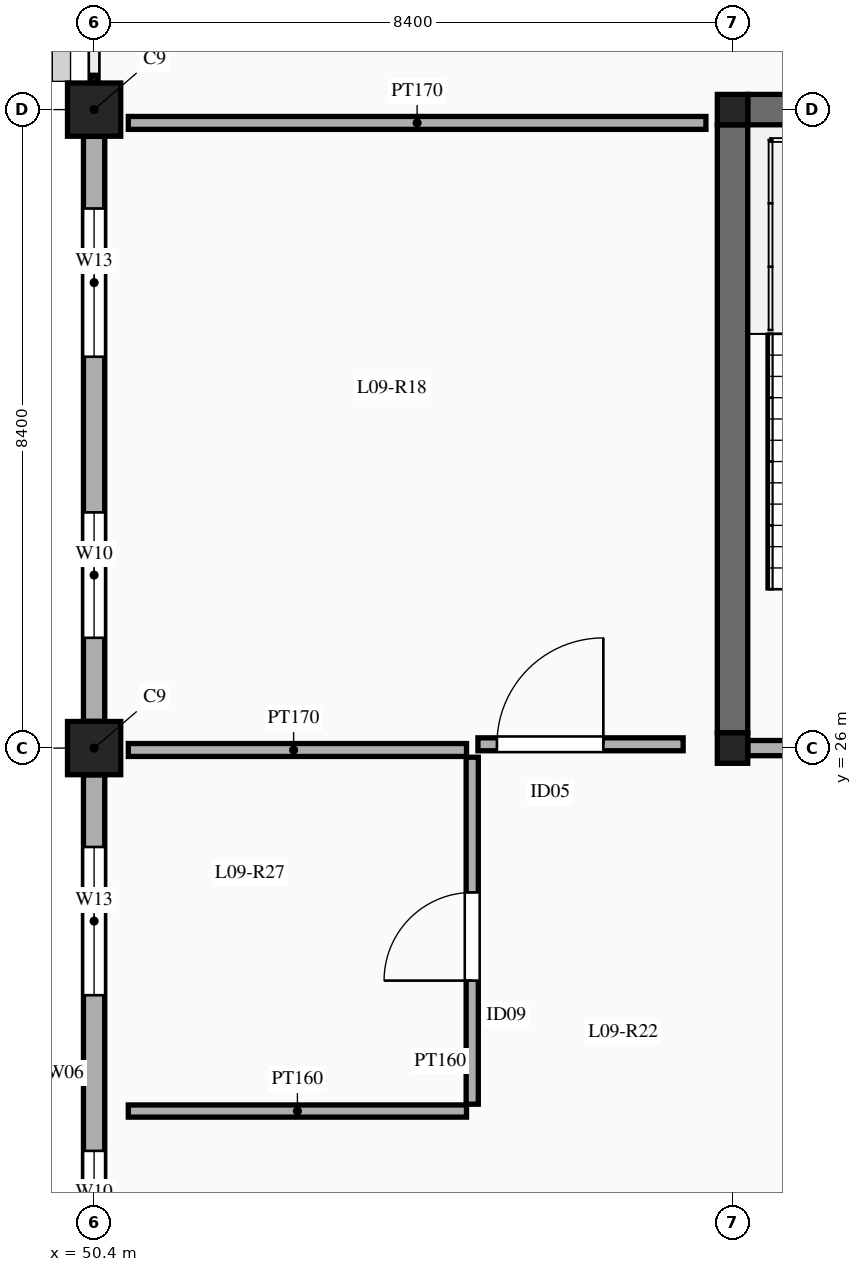
"""IFC4 building model, lengths in metres.
Left out: names, types, materials, properties, quantities, classifications, styles, units other than length and angle.
Written with IfcOpenShell. Run it as: python <this file> out.ifc"""

import sys

from ifc_helpers import new_model, si_unit, direction, frame, frame_2d, origin, origin_2d, place, context, subcontext, project, spatial, rectangle, extrude, element, fill, save


model = new_model("IFC4")
c1 = context("Model", 3, precision=1e-05, world=origin(), true_north=direction((0.0, 1.0)))
c2 = subcontext(c1, "Body", "Model", "MODEL_VIEW")
j1 = project(units=[si_unit("LENGTHUNIT", "METRE"), si_unit("PLANEANGLEUNIT", "RADIAN")], contexts=[c1])
p1 = place(None, origin())
s1 = spatial("IfcSite", under=j1, at=p1, CompositionType="ELEMENT")
p2 = place(p1, origin())
s2 = spatial("IfcBuilding", under=s1, at=p2, CompositionType="ELEMENT")
p3 = place(p2, frame((0.0, 0.0, 42.0)))
s3 = spatial("IfcBuildingStorey", under=s2, at=p3, CompositionType="ELEMENT", Elevation=42.0)
for number, where, z_axis, x_axis in (
    (1, (50.4, 26.0, 0.0), (0.0, 0.0, 1.0), (1.0, 0.0, 0.0)),
    (2, (50.4, 34.4, 0.0), (0.0, 0.0, 1.0), (1.0, 0.0, 0.0)),
):
    element("IfcColumn", number, at=place(p3, frame(where, z_axis=z_axis, x_axis=x_axis)), inside=s3, PredefinedType="COLUMN", context=c2, shape_type="SweptSolid", body=[
        extrude(rectangle(XDim=0.7, YDim=0.7, at=origin_2d()), origin(), (0.0, 0.0, 1.0), 4.5),
    ])
for number, where, z_axis, x_axis in (
    (3, (58.8, 26.0, 0.0), (0.0, 0.0, 1.0), (1.0, 0.0, 0.0)),
    (4, (58.8, 34.4, 0.0), (0.0, 0.0, 1.0), (1.0, 0.0, 0.0)),
):
    element("IfcColumn", number, at=place(p3, frame(where, z_axis=z_axis, x_axis=x_axis)), inside=s3, PredefinedType="COLUMN", context=c2, shape_type="SweptSolid", body=[
        extrude(rectangle(XDim=0.4, YDim=0.4, at=origin_2d()), origin(), (0.0, 0.0, 1.0), 4.5),
    ])
for number, where, z_axis, x_axis in (
    (5, (58.8, 26.2, 0.0), (0.0, 0.0, 1.0), (0.0, 1.0, 0.0)),
    (6, (59.0, 34.4, 0.0), (0.0, 0.0, 1.0), (1.0, 0.0, 0.0)),
):
    element("IfcWall", number, at=place(p3, frame(where, z_axis=z_axis, x_axis=x_axis)), inside=s3, PredefinedType="SHEAR", context=c2, shape_type="SweptSolid", body=[
        extrude(rectangle(XDim=8.0, YDim=0.4, at=frame_2d((4.0, 0.0))), origin(), (0.0, 0.0, 1.0), 4.5),
    ])
p4 = place(p3, frame((50.4, 17.952, 0.0), z_axis=(0.0, 0.0, 1.0), x_axis=(0.0, 1.0, 0.0)))
e7 = element("IfcWall", 7, at=p4, inside=s3, PredefinedType="ELEMENTEDWALL", context=c2, shape_type="SweptSolid", body=[
    extrude(rectangle(XDim=7.696, YDim=0.28, at=frame_2d((3.848, 0.0))), origin(), (0.0, 0.0, 1.0), 3.55),
])
p5 = place(p4, frame((1.099, 0.0, 0.9)))
e8 = element("IfcOpeningElement", 8, at=p5, cuts=e7, PredefinedType="OPENING", context=c2, shape_type="SweptSolid", body=[
    extrude(rectangle(XDim=1.65, YDim=1.95, at=frame_2d((0.825, 0.975))), frame((0.0, 0.15, 0.0), z_axis=(0.0, -1.0, 0.0), x_axis=(1.0, 0.0, 0.0)), (0.0, 0.0, 1.0), 0.3),
])
p6 = place(p4, frame((4.797, 0.0, 0.9)))
e9 = element("IfcOpeningElement", 9, at=p6, cuts=e7, PredefinedType="OPENING", context=c2, shape_type="SweptSolid", body=[
    extrude(rectangle(XDim=1.95, YDim=2.0, at=frame_2d((0.975, 1.0))), frame((0.0, 0.15, 0.0), z_axis=(0.0, -1.0, 0.0), x_axis=(1.0, 0.0, 0.0)), (0.0, 0.0, 1.0), 0.3),
])
p7 = place(p3, frame((50.4, 26.352, 0.0), z_axis=(0.0, 0.0, 1.0), x_axis=(0.0, 1.0, 0.0)))
e10 = element("IfcWall", 10, at=p7, inside=s3, PredefinedType="ELEMENTEDWALL", context=c2, shape_type="SweptSolid", body=[
    extrude(rectangle(XDim=7.696, YDim=0.28, at=frame_2d((3.848, 0.0))), origin(), (0.0, 0.0, 1.0), 3.55),
])
p8 = place(p7, frame((1.099, 0.0, 0.9)))
e11 = element("IfcOpeningElement", 11, at=p8, cuts=e10, PredefinedType="OPENING", context=c2, shape_type="SweptSolid", body=[
    extrude(rectangle(XDim=1.65, YDim=1.95, at=frame_2d((0.825, 0.975))), frame((0.0, 0.15, 0.0), z_axis=(0.0, -1.0, 0.0), x_axis=(1.0, 0.0, 0.0)), (0.0, 0.0, 1.0), 0.3),
])
p9 = place(p7, frame((4.797, 0.0, 0.9)))
e12 = element("IfcOpeningElement", 12, at=p9, cuts=e10, PredefinedType="OPENING", context=c2, shape_type="SweptSolid", body=[
    extrude(rectangle(XDim=1.95, YDim=2.0, at=frame_2d((0.975, 1.0))), frame((0.0, 0.15, 0.0), z_axis=(0.0, -1.0, 0.0), x_axis=(1.0, 0.0, 0.0)), (0.0, 0.0, 1.0), 0.3),
])
p10 = place(p3, frame((59.0, 26.0, 0.0), z_axis=(0.0, 0.0, 1.0), x_axis=(1.0, 0.0, 0.0)))
e13 = element("IfcWall", 13, at=p10, inside=s3, PredefinedType="SOLIDWALL", context=c2, shape_type="SweptSolid", body=[
    extrude(rectangle(XDim=8.0, YDim=0.2, at=frame_2d((4.0, 0.0))), origin(), (0.0, 0.0, 1.0), 3.78),
])
p11 = place(p10, frame((1.55, 0.0, 0.0)))
e14 = element("IfcOpeningElement", 14, at=p11, cuts=e13, PredefinedType="OPENING", context=c2, shape_type="SweptSolid", body=[
    extrude(rectangle(XDim=1.15, YDim=2.15, at=frame_2d((0.575, 1.075))), frame((0.0, 0.11, 0.0), z_axis=(0.0, -1.0, 0.0), x_axis=(1.0, 0.0, 0.0)), (0.0, 0.0, 1.0), 0.22),
])
p12 = place(p10, frame((5.35, 0.0, 0.0)))
e15 = element("IfcOpeningElement", 15, at=p12, cuts=e13, PredefinedType="OPENING", context=c2, shape_type="SweptSolid", body=[
    extrude(rectangle(XDim=1.22, YDim=2.15, at=frame_2d((0.61, 1.075))), frame((0.0, 0.11, 0.0), z_axis=(0.0, -1.0, 0.0), x_axis=(1.0, 0.0, 0.0)), (0.0, 0.0, 1.0), 0.22),
])
p13 = place(p3, frame((55.45, 26.05, 0.0), z_axis=(0.0, 0.0, 1.0), x_axis=(1.0, 0.0, 0.0)))
e16 = element("IfcWall", 16, at=p13, inside=s3, PredefinedType="PARTITIONING", context=c2, shape_type="SweptSolid", body=[
    extrude(rectangle(XDim=2.7, YDim=0.17, at=frame_2d((1.35, 0.0))), origin(), (0.0, 0.0, 1.0), 3.45),
])
p14 = place(p13, frame((0.25, 0.0, 0.0)))
e17 = element("IfcOpeningElement", 17, at=p14, cuts=e16, PredefinedType="OPENING", context=c2, shape_type="SweptSolid", body=[
    extrude(rectangle(XDim=1.4, YDim=2.25, at=frame_2d((0.7, 1.125))), frame((0.0, 0.095, 0.0), z_axis=(0.0, -1.0, 0.0), x_axis=(1.0, 0.0, 0.0)), (0.0, 0.0, 1.0), 0.19),
])
p15 = place(p3, frame((50.85, 25.975, 0.0), z_axis=(0.0, 0.0, 1.0), x_axis=(1.0, 0.0, 0.0)))
e18 = element("IfcWall", 18, at=p15, inside=s3, PredefinedType="PARTITIONING", context=c2, shape_type="SweptSolid", body=[
    extrude(rectangle(XDim=4.45, YDim=0.17, at=frame_2d((2.225, 0.0))), origin(), (0.0, 0.0, 1.0), 3.45),
])
p16 = place(p3, frame((50.85, 34.225, 0.0), z_axis=(0.0, 0.0, 1.0), x_axis=(1.0, 0.0, 0.0)))
e19 = element("IfcWall", 19, at=p16, inside=s3, PredefinedType="PARTITIONING", context=c2, shape_type="SweptSolid", body=[
    extrude(rectangle(XDim=7.6, YDim=0.17, at=frame_2d((3.8, 0.0))), origin(), (0.0, 0.0, 1.0), 3.45),
])
p17 = place(p3, frame((50.85, 21.225, 0.0), z_axis=(0.0, 0.0, 1.0), x_axis=(1.0, 0.0, 0.0)))
e20 = element("IfcWall", 20, at=p17, inside=s3, PredefinedType="PARTITIONING", context=c2, shape_type="SweptSolid", body=[
    extrude(rectangle(XDim=4.45, YDim=0.16, at=frame_2d((2.225, 0.0))), origin(), (0.0, 0.0, 1.0), 3.45),
])
p18 = place(p3, frame((55.375, 21.315, 0.0), z_axis=(0.0, 0.0, 1.0), x_axis=(0.0, 1.0, 0.0)))
e21 = element("IfcWall", 21, at=p18, inside=s3, PredefinedType="PARTITIONING", context=c2, shape_type="SweptSolid", body=[
    extrude(rectangle(XDim=4.565, YDim=0.16, at=frame_2d((2.282, 0.0))), origin(), (0.0, 0.0, 1.0), 3.45),
])
p19 = place(p18, frame((1.626, 0.0, 0.0)))
e22 = element("IfcOpeningElement", 22, at=p19, cuts=e21, PredefinedType="OPENING", context=c2, shape_type="SweptSolid", body=[
    extrude(rectangle(XDim=1.16, YDim=2.2, at=frame_2d((0.58, 1.1))), frame((0.0, 0.09, 0.0), z_axis=(0.0, -1.0, 0.0), x_axis=(1.0, 0.0, 0.0)), (0.0, 0.0, 1.0), 0.18),
])
p20 = place(p5, origin())
e23 = element("IfcWindow", 23, at=p20, inside=s3, PartitioningType="DOUBLE_PANEL_HORIZONTAL", PredefinedType="WINDOW", context=c2, shape_type="SweptSolid", body=[
    extrude(rectangle(XDim=1.65, YDim=1.95, at=frame_2d((0.825, 0.975))), frame((0.0, 0.03, 0.0), z_axis=(0.0, -1.0, 0.0), x_axis=(1.0, 0.0, 0.0)), (0.0, 0.0, 1.0), 0.06),
])
fill(e8, e23)
p21 = place(p6, origin())
e24 = element("IfcWindow", 24, at=p21, inside=s3, PartitioningType="TRIPLE_PANEL_VERTICAL", PredefinedType="WINDOW", context=c2, shape_type="SweptSolid", body=[
    extrude(rectangle(XDim=1.95, YDim=2.0, at=frame_2d((0.975, 1.0))), frame((0.0, 0.03, 0.0), z_axis=(0.0, -1.0, 0.0), x_axis=(1.0, 0.0, 0.0)), (0.0, 0.0, 1.0), 0.06),
])
fill(e9, e24)
p22 = place(p8, origin())
e25 = element("IfcWindow", 25, at=p22, inside=s3, PartitioningType="DOUBLE_PANEL_HORIZONTAL", PredefinedType="WINDOW", context=c2, shape_type="SweptSolid", body=[
    extrude(rectangle(XDim=1.65, YDim=1.95, at=frame_2d((0.825, 0.975))), frame((0.0, 0.03, 0.0), z_axis=(0.0, -1.0, 0.0), x_axis=(1.0, 0.0, 0.0)), (0.0, 0.0, 1.0), 0.06),
])
fill(e11, e25)
p23 = place(p9, origin())
e26 = element("IfcWindow", 26, at=p23, inside=s3, PartitioningType="TRIPLE_PANEL_VERTICAL", PredefinedType="WINDOW", context=c2, shape_type="SweptSolid", body=[
    extrude(rectangle(XDim=1.95, YDim=2.0, at=frame_2d((0.975, 1.0))), frame((0.0, 0.03, 0.0), z_axis=(0.0, -1.0, 0.0), x_axis=(1.0, 0.0, 0.0)), (0.0, 0.0, 1.0), 0.06),
])
fill(e12, e26)
p24 = place(p14, origin())
e27 = element("IfcDoor", 27, at=p24, inside=s3, OperationType="SINGLE_SWING_RIGHT", PredefinedType="DOOR", context=c2, shape_type="SweptSolid", body=[
    extrude(rectangle(XDim=1.4, YDim=2.25, at=frame_2d((0.7, 1.125))), frame((0.0, 0.025, 0.0), z_axis=(0.0, -1.0, 0.0), x_axis=(1.0, 0.0, 0.0)), (0.0, 0.0, 1.0), 0.05),
])
fill(e17, e27)
p25 = place(p19, origin())
e28 = element("IfcDoor", 28, at=p25, inside=s3, OperationType="SINGLE_SWING_LEFT", PredefinedType="DOOR", context=c2, shape_type="SweptSolid", body=[
    extrude(rectangle(XDim=1.16, YDim=2.2, at=frame_2d((0.58, 1.1))), frame((0.0, 0.025, 0.0), z_axis=(0.0, -1.0, 0.0), x_axis=(1.0, 0.0, 0.0)), (0.0, 0.0, 1.0), 0.05),
])
fill(e22, e28)
save(model, sys.argv[1])
